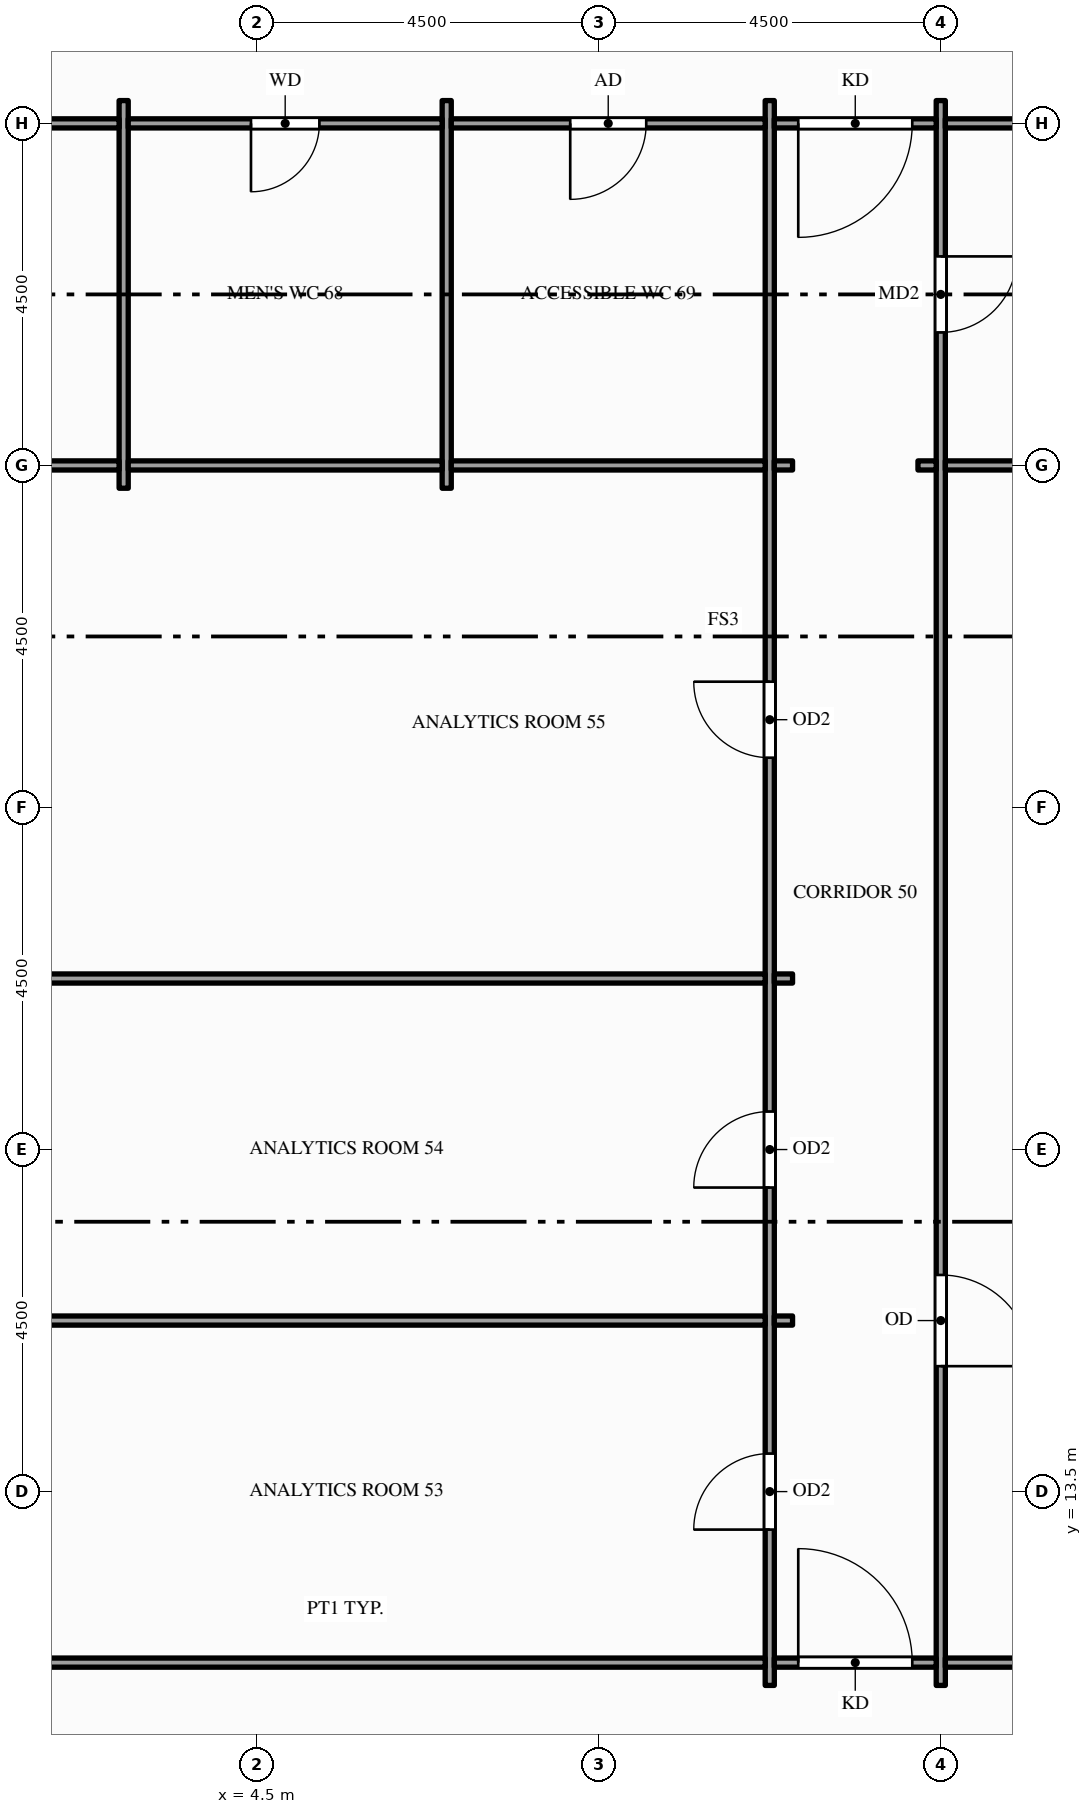
"""IFC4 building model, lengths in metres.
Left out: names, types, materials, properties, quantities, classifications, styles, units other than length and angle.
Written with IfcOpenShell. Run it as: python <this file> out.ifc"""

import sys

from ifc_helpers import new_model, si_unit, direction, frame, frame_2d, origin, place, context, subcontext, project, spatial, rectangle, extrude, element, fill, save


model = new_model("IFC4")
c1 = context("Model", 3, precision=1e-05, world=origin(), true_north=direction((0.0, 1.0)))
c2 = subcontext(c1, "Body", "Model", "MODEL_VIEW")
j1 = project(units=[si_unit("LENGTHUNIT", "METRE"), si_unit("PLANEANGLEUNIT", "RADIAN")], contexts=[c1])
p1 = place(None, origin())
s1 = spatial("IfcSite", under=j1, at=p1, CompositionType="ELEMENT")
p2 = place(p1, origin())
s2 = spatial("IfcBuilding", under=s1, at=p2, CompositionType="ELEMENT")
p3 = place(p2, frame((0.0, 0.0, 151.0)))
s3 = spatial("IfcBuildingStorey", under=s2, at=p3, CompositionType="ELEMENT", Elevation=151.0)
for number, where, z_axis, x_axis in (
    (1, (2.75, 26.7, 0.0), (0.0, 0.0, 1.0), (0.0, 1.0, 0.0)),
    (2, (7.0, 26.7, 0.0), (0.0, 0.0, 1.0), (0.0, 1.0, 0.0)),
):
    element("IfcWall", number, at=place(p3, frame(where, z_axis=z_axis, x_axis=x_axis)), inside=s3, PredefinedType="PARTITIONING", context=c2, shape_type="SweptSolid", body=[
        extrude(rectangle(XDim=5.1, YDim=0.12, at=frame_2d((2.55, 0.0))), origin(), (0.0, 0.0, 1.0), 3.85),
    ])
p4 = place(p3, frame((11.25, 10.95, 0.0), z_axis=(0.0, 0.0, 1.0), x_axis=(0.0, 1.0, 0.0)))
e3 = element("IfcWall", 3, at=p4, inside=s3, PredefinedType="PARTITIONING", context=c2, shape_type="SweptSolid", body=[
    extrude(rectangle(XDim=20.85, YDim=0.12, at=frame_2d((10.425, 0.0))), origin(), (0.0, 0.0, 1.0), 2.6),
])
p5 = place(p4, frame((2.05, 0.0, 0.0)))
e4 = element("IfcOpeningElement", 4, at=p5, cuts=e3, PredefinedType="OPENING", context=c2, shape_type="SweptSolid", body=[
    extrude(rectangle(XDim=1.0, YDim=2.1, at=frame_2d((0.5, 1.05))), frame((0.0, 0.07, 0.0), z_axis=(0.0, -1.0, 0.0), x_axis=(1.0, 0.0, 0.0)), (0.0, 0.0, 1.0), 0.14),
])
p6 = place(p4, frame((6.55, 0.0, 0.0)))
e5 = element("IfcOpeningElement", 5, at=p6, cuts=e3, PredefinedType="OPENING", context=c2, shape_type="SweptSolid", body=[
    extrude(rectangle(XDim=1.0, YDim=2.1, at=frame_2d((0.5, 1.05))), frame((0.0, 0.07, 0.0), z_axis=(0.0, -1.0, 0.0), x_axis=(1.0, 0.0, 0.0)), (0.0, 0.0, 1.0), 0.14),
])
p7 = place(p4, frame((12.205, 0.0, 0.0)))
e6 = element("IfcOpeningElement", 6, at=p7, cuts=e3, PredefinedType="OPENING", context=c2, shape_type="SweptSolid", body=[
    extrude(rectangle(XDim=1.0, YDim=2.1, at=frame_2d((0.5, 1.05))), frame((0.0, 0.07, 0.0), z_axis=(0.0, -1.0, 0.0), x_axis=(1.0, 0.0, 0.0)), (0.0, 0.0, 1.0), 0.14),
])
p8 = place(p3, frame((13.5, 10.95, 0.0), z_axis=(0.0, 0.0, 1.0), x_axis=(0.0, 1.0, 0.0)))
e7 = element("IfcWall", 7, at=p8, inside=s3, PredefinedType="PARTITIONING", context=c2, shape_type="SweptSolid", body=[
    extrude(rectangle(XDim=20.85, YDim=0.12, at=frame_2d((10.425, 0.0))), origin(), (0.0, 0.0, 1.0), 2.6),
])
p9 = place(p8, frame((17.8, 0.0, 0.0)))
e8 = element("IfcOpeningElement", 8, at=p9, cuts=e7, PredefinedType="OPENING", context=c2, shape_type="SweptSolid", body=[
    extrude(rectangle(XDim=1.0, YDim=2.1, at=frame_2d((0.5, 1.05))), frame((0.0, 0.07, 0.0), z_axis=(0.0, -1.0, 0.0), x_axis=(1.0, 0.0, 0.0)), (0.0, 0.0, 1.0), 0.14),
])
p10 = place(p8, frame((4.2, 0.0, 0.0)))
e9 = element("IfcOpeningElement", 9, at=p10, cuts=e7, PredefinedType="OPENING", context=c2, shape_type="SweptSolid", body=[
    extrude(rectangle(XDim=1.2, YDim=2.1, at=frame_2d((0.6, 1.05))), frame((0.0, 0.07, 0.0), z_axis=(0.0, -1.0, 0.0), x_axis=(1.0, 0.0, 0.0)), (0.0, 0.0, 1.0), 0.14),
])
p11 = place(p3, frame((0.15, 11.25, 0.0), z_axis=(0.0, 0.0, 1.0), x_axis=(1.0, 0.0, 0.0)))
e10 = element("IfcWall", 10, at=p11, inside=s3, PredefinedType="PARTITIONING", context=c2, shape_type="SweptSolid", body=[
    extrude(rectangle(XDim=11.04, YDim=0.12, at=frame_2d((5.52, 0.0))), origin(), (0.0, 0.0, 1.0), 2.87),
])
p12 = place(p3, frame((11.31, 11.25, 0.0), z_axis=(0.0, 0.0, 1.0), x_axis=(1.0, 0.0, 0.0)))
e11 = element("IfcWall", 11, at=p12, inside=s3, PredefinedType="PARTITIONING", context=c2, shape_type="SweptSolid", body=[
    extrude(rectangle(XDim=2.13, YDim=0.12, at=frame_2d((1.065, 0.0))), origin(), (0.0, 0.0, 1.0), 2.87),
])
p13 = place(p12, frame((0.315, 0.0, 0.0)))
e12 = element("IfcOpeningElement", 12, at=p13, cuts=e11, PredefinedType="OPENING", context=c2, shape_type="SweptSolid", body=[
    extrude(rectangle(XDim=1.5, YDim=2.1, at=frame_2d((0.75, 1.05))), frame((0.0, 0.07, 0.0), z_axis=(0.0, -1.0, 0.0), x_axis=(1.0, 0.0, 0.0)), (0.0, 0.0, 1.0), 0.14),
])
p14 = place(p3, frame((13.56, 11.25, 0.0), z_axis=(0.0, 0.0, 1.0), x_axis=(1.0, 0.0, 0.0)))
e13 = element("IfcWall", 13, at=p14, inside=s3, PredefinedType="PARTITIONING", context=c2, shape_type="SweptSolid", body=[
    extrude(rectangle(XDim=17.88, YDim=0.12, at=frame_2d((8.94, 0.0))), origin(), (0.0, 0.0, 1.0), 2.87),
])
p15 = place(p14, frame((8.04, 0.0, 0.0)))
e14 = element("IfcOpeningElement", 14, at=p15, cuts=e13, PredefinedType="OPENING", context=c2, shape_type="SweptSolid", body=[
    extrude(rectangle(XDim=1.8, YDim=2.1, at=frame_2d((0.9, 1.05))), frame((0.0, 0.07, 0.0), z_axis=(0.0, -1.0, 0.0), x_axis=(1.0, 0.0, 0.0)), (0.0, 0.0, 1.0), 0.14),
])
p16 = place(p3, frame((0.15, 15.75, 0.0), z_axis=(0.0, 0.0, 1.0), x_axis=(1.0, 0.0, 0.0)))
e15 = element("IfcWall", 15, at=p16, inside=s3, PredefinedType="PARTITIONING", context=c2, shape_type="SweptSolid", body=[
    extrude(rectangle(XDim=11.04, YDim=0.12, at=frame_2d((5.52, 0.0))), origin(), (0.0, 0.0, 1.0), 2.87),
])
p17 = place(p3, frame((11.31, 15.75, 0.0), z_axis=(0.0, 0.0, 1.0), x_axis=(1.0, 0.0, 0.0)))
e16 = element("IfcWall", 16, at=p17, inside=s3, PredefinedType="PARTITIONING", context=c2, shape_type="SweptSolid", body=[
    extrude(rectangle(XDim=0.24, YDim=0.12, at=frame_2d((0.12, 0.0))), origin(), (0.0, 0.0, 1.0), 2.87),
])
p18 = place(p3, frame((0.15, 20.25, 0.0), z_axis=(0.0, 0.0, 1.0), x_axis=(1.0, 0.0, 0.0)))
e17 = element("IfcWall", 17, at=p18, inside=s3, PredefinedType="PARTITIONING", context=c2, shape_type="SweptSolid", body=[
    extrude(rectangle(XDim=11.04, YDim=0.12, at=frame_2d((5.52, 0.0))), origin(), (0.0, 0.0, 1.0), 2.87),
])
p19 = place(p3, frame((11.31, 20.25, 0.0), z_axis=(0.0, 0.0, 1.0), x_axis=(1.0, 0.0, 0.0)))
e18 = element("IfcWall", 18, at=p19, inside=s3, PredefinedType="PARTITIONING", context=c2, shape_type="SweptSolid", body=[
    extrude(rectangle(XDim=0.24, YDim=0.12, at=frame_2d((0.12, 0.0))), origin(), (0.0, 0.0, 1.0), 2.87),
])
p20 = place(p3, frame((-1.35, 27.0, 0.0), z_axis=(0.0, 0.0, 1.0), x_axis=(1.0, 0.0, 0.0)))
e19 = element("IfcWall", 19, at=p20, inside=s3, PredefinedType="PARTITIONING", context=c2, shape_type="SweptSolid", body=[
    extrude(rectangle(XDim=4.04, YDim=0.12, at=frame_2d((2.02, 0.0))), origin(), (0.0, 0.0, 1.0), 2.87),
])
for number, where, z_axis, x_axis in (
    (20, (2.81, 27.0, 0.0), (0.0, 0.0, 1.0), (1.0, 0.0, 0.0)),
    (21, (7.06, 27.0, 0.0), (0.0, 0.0, 1.0), (1.0, 0.0, 0.0)),
):
    element("IfcWall", number, at=place(p3, frame(where, z_axis=z_axis, x_axis=x_axis)), inside=s3, PredefinedType="PARTITIONING", context=c2, shape_type="SweptSolid", body=[
        extrude(rectangle(XDim=4.13, YDim=0.12, at=frame_2d((2.065, 0.0))), origin(), (0.0, 0.0, 1.0), 2.87),
    ])
for number, where, z_axis, x_axis in (
    (22, (11.31, 27.0, 0.0), (0.0, 0.0, 1.0), (1.0, 0.0, 0.0)),
    (23, (13.2, 27.0, 0.0), (0.0, 0.0, 1.0), (1.0, 0.0, 0.0)),
):
    element("IfcWall", number, at=place(p3, frame(where, z_axis=z_axis, x_axis=x_axis)), inside=s3, PredefinedType="PARTITIONING", context=c2, shape_type="SweptSolid", body=[
        extrude(rectangle(XDim=0.24, YDim=0.12, at=frame_2d((0.12, 0.0))), origin(), (0.0, 0.0, 1.0), 2.87),
    ])
p21 = place(p3, frame((13.56, 27.0, 0.0), z_axis=(0.0, 0.0, 1.0), x_axis=(1.0, 0.0, 0.0)))
e24 = element("IfcWall", 24, at=p21, inside=s3, PredefinedType="PARTITIONING", context=c2, shape_type="SweptSolid", body=[
    extrude(rectangle(XDim=7.57, YDim=0.12, at=frame_2d((3.785, 0.0))), origin(), (0.0, 0.0, 1.0), 2.87),
])
p22 = place(p3, frame((-1.35, 31.5, 0.0), z_axis=(0.0, 0.0, 1.0), x_axis=(1.0, 0.0, 0.0)))
e25 = element("IfcWall", 25, at=p22, inside=s3, PredefinedType="PARTITIONING", context=c2, shape_type="SweptSolid", body=[
    extrude(rectangle(XDim=4.04, YDim=0.12, at=frame_2d((2.02, 0.0))), origin(), (0.0, 0.0, 1.0), 2.87),
])
p23 = place(p22, frame((0.85, 0.0, 0.0)))
e26 = element("IfcOpeningElement", 26, at=p23, cuts=e25, PredefinedType="OPENING", context=c2, shape_type="SweptSolid", body=[
    extrude(rectangle(XDim=0.9, YDim=2.1, at=frame_2d((0.45, 1.05))), frame((0.0, 0.07, 0.0), z_axis=(0.0, -1.0, 0.0), x_axis=(1.0, 0.0, 0.0)), (0.0, 0.0, 1.0), 0.14),
])
p24 = place(p3, frame((2.81, 31.5, 0.0), z_axis=(0.0, 0.0, 1.0), x_axis=(1.0, 0.0, 0.0)))
e27 = element("IfcWall", 27, at=p24, inside=s3, PredefinedType="PARTITIONING", context=c2, shape_type="SweptSolid", body=[
    extrude(rectangle(XDim=4.13, YDim=0.12, at=frame_2d((2.065, 0.0))), origin(), (0.0, 0.0, 1.0), 2.87),
])
p25 = place(p24, frame((1.615, 0.0, 0.0)))
e28 = element("IfcOpeningElement", 28, at=p25, cuts=e27, PredefinedType="OPENING", context=c2, shape_type="SweptSolid", body=[
    extrude(rectangle(XDim=0.9, YDim=2.1, at=frame_2d((0.45, 1.05))), frame((0.0, 0.07, 0.0), z_axis=(0.0, -1.0, 0.0), x_axis=(1.0, 0.0, 0.0)), (0.0, 0.0, 1.0), 0.14),
])
p26 = place(p3, frame((7.06, 31.5, 0.0), z_axis=(0.0, 0.0, 1.0), x_axis=(1.0, 0.0, 0.0)))
e29 = element("IfcWall", 29, at=p26, inside=s3, PredefinedType="PARTITIONING", context=c2, shape_type="SweptSolid", body=[
    extrude(rectangle(XDim=4.13, YDim=0.12, at=frame_2d((2.065, 0.0))), origin(), (0.0, 0.0, 1.0), 2.87),
])
p27 = place(p26, frame((1.565, 0.0, 0.0)))
e30 = element("IfcOpeningElement", 30, at=p27, cuts=e29, PredefinedType="OPENING", context=c2, shape_type="SweptSolid", body=[
    extrude(rectangle(XDim=1.0, YDim=2.1, at=frame_2d((0.5, 1.05))), frame((0.0, 0.07, 0.0), z_axis=(0.0, -1.0, 0.0), x_axis=(1.0, 0.0, 0.0)), (0.0, 0.0, 1.0), 0.14),
])
p28 = place(p3, frame((11.31, 31.5, 0.0), z_axis=(0.0, 0.0, 1.0), x_axis=(1.0, 0.0, 0.0)))
e31 = element("IfcWall", 31, at=p28, inside=s3, PredefinedType="PARTITIONING", context=c2, shape_type="SweptSolid", body=[
    extrude(rectangle(XDim=2.13, YDim=0.12, at=frame_2d((1.065, 0.0))), origin(), (0.0, 0.0, 1.0), 2.87),
])
p29 = place(p28, frame((0.315, 0.0, 0.0)))
e32 = element("IfcOpeningElement", 32, at=p29, cuts=e31, PredefinedType="OPENING", context=c2, shape_type="SweptSolid", body=[
    extrude(rectangle(XDim=1.5, YDim=2.1, at=frame_2d((0.75, 1.05))), frame((0.0, 0.07, 0.0), z_axis=(0.0, -1.0, 0.0), x_axis=(1.0, 0.0, 0.0)), (0.0, 0.0, 1.0), 0.14),
])
p30 = place(p3, frame((13.56, 31.5, 0.0), z_axis=(0.0, 0.0, 1.0), x_axis=(1.0, 0.0, 0.0)))
e33 = element("IfcWall", 33, at=p30, inside=s3, PredefinedType="PARTITIONING", context=c2, shape_type="SweptSolid", body=[
    extrude(rectangle(XDim=7.29, YDim=0.12, at=frame_2d((3.645, 0.0))), origin(), (0.0, 0.0, 1.0), 2.87),
])
p31 = place(p13, origin())
e34 = element("IfcDoor", 34, at=p31, inside=s3, OperationType="SINGLE_SWING_LEFT", PredefinedType="DOOR", context=c2, shape_type="SweptSolid", body=[
    extrude(rectangle(XDim=1.5, YDim=2.1, at=frame_2d((0.75, 1.05))), frame((0.0, 0.025, 0.0), z_axis=(0.0, -1.0, 0.0), x_axis=(1.0, 0.0, 0.0)), (0.0, 0.0, 1.0), 0.05),
])
fill(e12, e34)
p32 = place(p29, origin())
e35 = element("IfcDoor", 35, at=p32, inside=s3, OperationType="SINGLE_SWING_LEFT", PredefinedType="DOOR", context=c2, shape_type="SweptSolid", body=[
    extrude(rectangle(XDim=1.5, YDim=2.1, at=frame_2d((0.75, 1.05))), frame((0.0, 0.025, 0.0), z_axis=(0.0, -1.0, 0.0), x_axis=(1.0, 0.0, 0.0)), (0.0, 0.0, 1.0), 0.05),
])
fill(e32, e35)
p33 = place(p5, origin())
e36 = element("IfcDoor", 36, at=p33, inside=s3, OperationType="SINGLE_SWING_LEFT", PredefinedType="DOOR", context=c2, shape_type="SweptSolid", body=[
    extrude(rectangle(XDim=1.0, YDim=2.1, at=frame_2d((0.5, 1.05))), frame((0.0, 0.025, 0.0), z_axis=(0.0, -1.0, 0.0), x_axis=(1.0, 0.0, 0.0)), (0.0, 0.0, 1.0), 0.05),
])
fill(e4, e36)
p34 = place(p6, origin())
e37 = element("IfcDoor", 37, at=p34, inside=s3, OperationType="SINGLE_SWING_LEFT", PredefinedType="DOOR", context=c2, shape_type="SweptSolid", body=[
    extrude(rectangle(XDim=1.0, YDim=2.1, at=frame_2d((0.5, 1.05))), frame((0.0, 0.025, 0.0), z_axis=(0.0, -1.0, 0.0), x_axis=(1.0, 0.0, 0.0)), (0.0, 0.0, 1.0), 0.05),
])
fill(e5, e37)
p35 = place(p7, origin())
e38 = element("IfcDoor", 38, at=p35, inside=s3, OperationType="SINGLE_SWING_RIGHT", PredefinedType="DOOR", context=c2, shape_type="SweptSolid", body=[
    extrude(rectangle(XDim=1.0, YDim=2.1, at=frame_2d((0.5, 1.05))), frame((0.0, 0.025, 0.0), z_axis=(0.0, -1.0, 0.0), x_axis=(1.0, 0.0, 0.0)), (0.0, 0.0, 1.0), 0.05),
])
fill(e6, e38)
p36 = place(p25, origin())
e39 = element("IfcDoor", 39, at=p36, inside=s3, OperationType="SINGLE_SWING_LEFT", PredefinedType="DOOR", context=c2, shape_type="SweptSolid", body=[
    extrude(rectangle(XDim=0.9, YDim=2.1, at=frame_2d((0.45, 1.05))), frame((0.0, 0.025, 0.0), z_axis=(0.0, -1.0, 0.0), x_axis=(1.0, 0.0, 0.0)), (0.0, 0.0, 1.0), 0.05),
])
fill(e28, e39)
p37 = place(p27, origin())
e40 = element("IfcDoor", 40, at=p37, inside=s3, OperationType="SINGLE_SWING_LEFT", PredefinedType="DOOR", context=c2, shape_type="SweptSolid", body=[
    extrude(rectangle(XDim=1.0, YDim=2.1, at=frame_2d((0.5, 1.05))), frame((0.0, 0.025, 0.0), z_axis=(0.0, -1.0, 0.0), x_axis=(1.0, 0.0, 0.0)), (0.0, 0.0, 1.0), 0.05),
])
fill(e30, e40)
p38 = place(p9, origin())
e41 = element("IfcDoor", 41, at=p38, inside=s3, OperationType="SINGLE_SWING_RIGHT", PredefinedType="DOOR", context=c2, shape_type="SweptSolid", body=[
    extrude(rectangle(XDim=1.0, YDim=2.1, at=frame_2d((0.5, 1.05))), frame((0.0, 0.025, 0.0), z_axis=(0.0, -1.0, 0.0), x_axis=(1.0, 0.0, 0.0)), (0.0, 0.0, 1.0), 0.05),
])
fill(e8, e41)
p39 = place(p10, origin())
e42 = element("IfcDoor", 42, at=p39, inside=s3, OperationType="SINGLE_SWING_LEFT", PredefinedType="DOOR", context=c2, shape_type="SweptSolid", body=[
    extrude(rectangle(XDim=1.2, YDim=2.1, at=frame_2d((0.6, 1.05))), frame((0.0, 0.025, 0.0), z_axis=(0.0, -1.0, 0.0), x_axis=(1.0, 0.0, 0.0)), (0.0, 0.0, 1.0), 0.05),
])
fill(e9, e42)
save(model, sys.argv[1])
